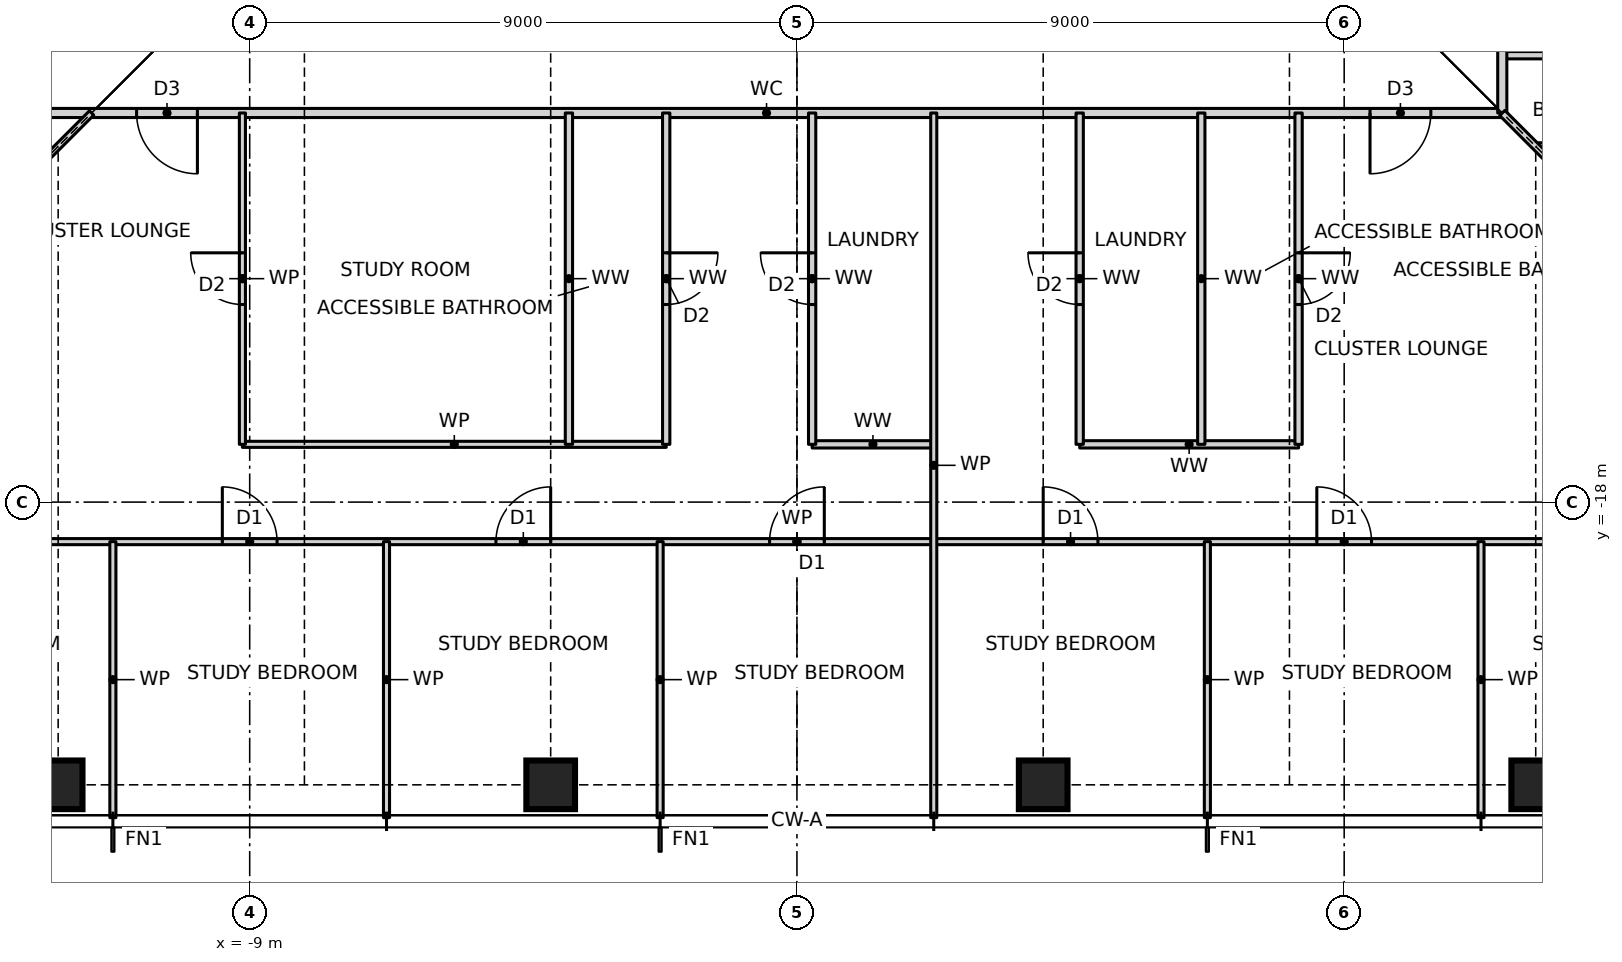
"""IFC4 building model, lengths in metres.
Left out: names, types, materials, properties, quantities, classifications, styles, units other than length and angle.
Written with IfcOpenShell. Run it as: python <this file> out.ifc"""

import sys

from ifc_helpers import new_model, si_unit, direction, frame, frame_2d, origin, origin_2d, place, context, subcontext, project, spatial, rectangle, hollow_rectangle, extrude, element, fill, save


model = new_model("IFC4")
c1 = context("Model", 3, precision=1e-05, world=origin(), true_north=direction((0.0, 1.0)))
c2 = subcontext(c1, "Body", "Model", "MODEL_VIEW")
j1 = project(units=[si_unit("LENGTHUNIT", "METRE"), si_unit("PLANEANGLEUNIT", "RADIAN")], contexts=[c1])
p1 = place(None, origin())
s1 = spatial("IfcSite", under=j1, at=p1, CompositionType="ELEMENT")
p2 = place(p1, origin())
s2 = spatial("IfcBuilding", under=s1, at=p2, CompositionType="ELEMENT")
p3 = place(p2, frame((0.0, 0.0, 50.0)))
s3 = spatial("IfcBuildingStorey", under=s2, at=p3, CompositionType="ELEMENT", Elevation=50.0)
for number, where, z_axis, x_axis in (
    (1, (-12.15, -22.65, 0.0), (0.0, 0.0, 1.0), (1.0, 0.0, 0.0)),
    (2, (-4.05, -22.65, 0.0), (0.0, 0.0, 1.0), (1.0, 0.0, 0.0)),
    (3, (4.05, -22.65, 0.0), (0.0, 0.0, 1.0), (1.0, 0.0, 0.0)),
    (4, (12.15, -22.65, 0.0), (0.0, 0.0, 1.0), (1.0, 0.0, 0.0)),
):
    element("IfcColumn", number, at=place(p3, frame(where, z_axis=z_axis, x_axis=x_axis)), inside=s3, PredefinedType="COLUMN", context=c2, shape_type="SweptSolid", body=[
        extrude(hollow_rectangle(XDim=0.8, YDim=0.8, WallThickness=0.09, at=origin_2d()), origin(), (0.0, 0.0, 1.0), 3.5),
    ])
p4 = place(p3, frame((-15.75, -18.65, 0.0), z_axis=(0.0, 0.0, 1.0), x_axis=(1.0, 0.0, 0.0)))
e5 = element("IfcWall", 5, at=p4, inside=s3, PredefinedType="PARTITIONING", context=c2, shape_type="SweptSolid", body=[
    extrude(rectangle(XDim=31.5, YDim=0.1, at=frame_2d((15.75, 0.0))), origin(), (0.0, 0.0, 1.0), 3.27),
])
p5 = place(p4, frame((1.8, 0.0, 0.0)))
e6 = element("IfcOpeningElement", 6, at=p5, cuts=e5, PredefinedType="OPENING", context=c2, shape_type="SweptSolid", body=[
    extrude(rectangle(XDim=0.9, YDim=2.1, at=frame_2d((0.45, 1.05))), frame((0.0, 0.06, 0.0), z_axis=(0.0, -1.0, 0.0), x_axis=(1.0, 0.0, 0.0)), (0.0, 0.0, 1.0), 0.12),
])
p6 = place(p4, frame((6.3, 0.0, 0.0)))
e7 = element("IfcOpeningElement", 7, at=p6, cuts=e5, PredefinedType="OPENING", context=c2, shape_type="SweptSolid", body=[
    extrude(rectangle(XDim=0.9, YDim=2.1, at=frame_2d((0.45, 1.05))), frame((0.0, 0.06, 0.0), z_axis=(0.0, -1.0, 0.0), x_axis=(1.0, 0.0, 0.0)), (0.0, 0.0, 1.0), 0.12),
])
p7 = place(p4, frame((10.8, 0.0, 0.0)))
e8 = element("IfcOpeningElement", 8, at=p7, cuts=e5, PredefinedType="OPENING", context=c2, shape_type="SweptSolid", body=[
    extrude(rectangle(XDim=0.9, YDim=2.1, at=frame_2d((0.45, 1.05))), frame((0.0, 0.06, 0.0), z_axis=(0.0, -1.0, 0.0), x_axis=(1.0, 0.0, 0.0)), (0.0, 0.0, 1.0), 0.12),
])
p8 = place(p4, frame((15.3, 0.0, 0.0)))
e9 = element("IfcOpeningElement", 9, at=p8, cuts=e5, PredefinedType="OPENING", context=c2, shape_type="SweptSolid", body=[
    extrude(rectangle(XDim=0.9, YDim=2.1, at=frame_2d((0.45, 1.05))), frame((0.0, 0.06, 0.0), z_axis=(0.0, -1.0, 0.0), x_axis=(1.0, 0.0, 0.0)), (0.0, 0.0, 1.0), 0.12),
])
p9 = place(p4, frame((19.8, 0.0, 0.0)))
e10 = element("IfcOpeningElement", 10, at=p9, cuts=e5, PredefinedType="OPENING", context=c2, shape_type="SweptSolid", body=[
    extrude(rectangle(XDim=0.9, YDim=2.1, at=frame_2d((0.45, 1.05))), frame((0.0, 0.06, 0.0), z_axis=(0.0, -1.0, 0.0), x_axis=(1.0, 0.0, 0.0)), (0.0, 0.0, 1.0), 0.12),
])
p10 = place(p4, frame((24.3, 0.0, 0.0)))
e11 = element("IfcOpeningElement", 11, at=p10, cuts=e5, PredefinedType="OPENING", context=c2, shape_type="SweptSolid", body=[
    extrude(rectangle(XDim=0.9, YDim=2.1, at=frame_2d((0.45, 1.05))), frame((0.0, 0.06, 0.0), z_axis=(0.0, -1.0, 0.0), x_axis=(1.0, 0.0, 0.0)), (0.0, 0.0, 1.0), 0.12),
])
p11 = place(p4, frame((28.8, 0.0, 0.0)))
e12 = element("IfcOpeningElement", 12, at=p11, cuts=e5, PredefinedType="OPENING", context=c2, shape_type="SweptSolid", body=[
    extrude(rectangle(XDim=0.9, YDim=2.1, at=frame_2d((0.45, 1.05))), frame((0.0, 0.06, 0.0), z_axis=(0.0, -1.0, 0.0), x_axis=(1.0, 0.0, 0.0)), (0.0, 0.0, 1.0), 0.12),
])
p12 = place(p3, frame((-9.12, -17.05, 0.0), z_axis=(0.0, 0.0, 1.0), x_axis=(1.0, 0.0, 0.0)))
e13 = element("IfcWall", 13, at=p12, inside=s3, PredefinedType="PARTITIONING", context=c2, shape_type="SweptSolid", body=[
    extrude(rectangle(XDim=6.97, YDim=0.1, at=frame_2d((3.485, 0.0))), origin(), (0.0, 0.0, 1.0), 3.27),
])
p13 = place(p3, frame((0.25, -17.05, 0.0), z_axis=(0.0, 0.0, 1.0), x_axis=(1.0, 0.0, 0.0)))
e14 = element("IfcWall", 14, at=p13, inside=s3, PredefinedType="PARTITIONING", context=c2, shape_type="SweptSolid", body=[
    extrude(rectangle(XDim=2.0, YDim=0.12, at=frame_2d((1.0, 0.0))), origin(), (0.0, 0.0, 1.0), 3.27),
])
p14 = place(p3, frame((4.65, -17.05, 0.0), z_axis=(0.0, 0.0, 1.0), x_axis=(1.0, 0.0, 0.0)))
e15 = element("IfcWall", 15, at=p14, inside=s3, PredefinedType="PARTITIONING", context=c2, shape_type="SweptSolid", body=[
    extrude(rectangle(XDim=3.6, YDim=0.12, at=frame_2d((1.8, 0.0))), origin(), (0.0, 0.0, 1.0), 3.27),
])
p15 = place(p3, frame((12.15, -12.15, 0.0), z_axis=(0.0, 0.0, 1.0), x_axis=(1.0, 0.0, 0.0)))
e16 = element("IfcWall", 16, at=p15, inside=s3, PredefinedType="PARTITIONING", context=c2, shape_type="SweptSolid", body=[
    extrude(rectangle(XDim=4.9, YDim=0.12, at=frame_2d((2.45, 0.0))), origin(), (0.0, 0.0, 1.0), 2.508),
])
p16 = place(p3, frame((-12.6, -11.6, 0.0), z_axis=(0.0, 0.0, 1.0), x_axis=(1.0, 0.0, 0.0)))
e17 = element("IfcWall", 17, at=p16, inside=s3, PredefinedType="PARTITIONING", context=c2, shape_type="SweptSolid", body=[
    extrude(rectangle(XDim=24.2, YDim=0.15, at=frame_2d((12.1, 0.0))), origin(), (0.0, 0.0, 1.0), 3.27),
])
p17 = place(p16, frame((1.74, 0.0, 0.0)))
e18 = element("IfcOpeningElement", 18, at=p17, cuts=e17, PredefinedType="OPENING", context=c2, shape_type="SweptSolid", body=[
    extrude(rectangle(XDim=1.0, YDim=2.1, at=frame_2d((0.5, 1.05))), frame((0.0, 0.085, 0.0), z_axis=(0.0, -1.0, 0.0), x_axis=(1.0, 0.0, 0.0)), (0.0, 0.0, 1.0), 0.17),
])
p18 = place(p16, frame((22.025, 0.0, 0.0)))
e19 = element("IfcOpeningElement", 19, at=p18, cuts=e17, PredefinedType="OPENING", context=c2, shape_type="SweptSolid", body=[
    extrude(rectangle(XDim=1.0, YDim=2.1, at=frame_2d((0.5, 1.05))), frame((0.0, 0.085, 0.0), z_axis=(0.0, -1.0, 0.0), x_axis=(1.0, 0.0, 0.0)), (0.0, 0.0, 1.0), 0.17),
])
p19 = place(p3, frame((11.6, -10.65, 0.0), z_axis=(0.0, 0.0, 1.0), x_axis=(1.0, 0.0, 0.0)))
e20 = element("IfcWall", 20, at=p19, inside=s3, PredefinedType="PARTITIONING", context=c2, shape_type="SweptSolid", body=[
    extrude(rectangle(XDim=5.45, YDim=0.12, at=frame_2d((2.725, 0.0))), origin(), (0.0, 0.0, 1.0), 3.27),
])
p20 = place(p19, frame((2.3, 0.0, 0.0)))
e21 = element("IfcOpeningElement", 21, at=p20, cuts=e20, PredefinedType="OPENING", context=c2, shape_type="SweptSolid", body=[
    extrude(rectangle(XDim=0.85, YDim=2.1, at=frame_2d((0.425, 1.05))), frame((0.0, 0.07, 0.0), z_axis=(0.0, -1.0, 0.0), x_axis=(1.0, 0.0, 0.0)), (0.0, 0.0, 1.0), 0.14),
])
p21 = place(p3, frame((-15.75, -15.75, 0.0), z_axis=(0.0, 0.0, 1.0), x_axis=(0.707106781187, 0.707106781187, 0.0)))
e22 = element("IfcWall", 22, at=p21, inside=s3, PredefinedType="PARTITIONING", context=c2, shape_type="SweptSolid", body=[
    extrude(rectangle(XDim=5.869, YDim=0.1, at=frame_2d((2.935, 0.0))), origin(), (0.0, 0.0, 1.0), 2.343),
])
p22 = place(p3, frame((11.6, -11.6, 0.0), z_axis=(0.0, 0.0, 1.0), x_axis=(0.0, 1.0, 0.0)))
e23 = element("IfcWall", 23, at=p22, inside=s3, PredefinedType="PARTITIONING", context=c2, shape_type="SweptSolid", body=[
    extrude(rectangle(XDim=23.2, YDim=0.15, at=frame_2d((11.6, 0.0))), origin(), (0.0, 0.0, 1.0), 3.27),
])
p23 = place(p22, frame((1.65, 0.0, 0.0)))
e24 = element("IfcOpeningElement", 24, at=p23, cuts=e23, PredefinedType="OPENING", context=c2, shape_type="SweptSolid", body=[
    extrude(rectangle(XDim=1.0, YDim=2.1, at=frame_2d((0.5, 1.05))), frame((0.0, 0.085, 0.0), z_axis=(0.0, -1.0, 0.0), x_axis=(1.0, 0.0, 0.0)), (0.0, 0.0, 1.0), 0.17),
])
p24 = place(p22, frame((3.8, 0.0, 0.0)))
e25 = element("IfcOpeningElement", 25, at=p24, cuts=e23, PredefinedType="OPENING", context=c2, shape_type="SweptSolid", body=[
    extrude(rectangle(XDim=0.9, YDim=2.1, at=frame_2d((0.45, 1.05))), frame((0.0, 0.085, 0.0), z_axis=(0.0, -1.0, 0.0), x_axis=(1.0, 0.0, 0.0)), (0.0, 0.0, 1.0), 0.17),
])
p25 = place(p3, frame((11.25, -23.19, 0.0), z_axis=(0.0, 0.0, 1.0), x_axis=(0.0, 1.0, 0.0)))
e26 = element("IfcWall", 26, at=p25, inside=s3, PredefinedType="PARTITIONING", context=c2, shape_type="SweptSolid", body=[
    extrude(rectangle(XDim=4.54, YDim=0.1, at=frame_2d((2.27, 0.0))), origin(), (0.0, 0.0, 1.0), 3.27),
])
p26 = place(p3, frame((8.25, -17.05, 0.0), z_axis=(0.0, 0.0, 1.0), x_axis=(0.0, 1.0, 0.0)))
e27 = element("IfcWall", 27, at=p26, inside=s3, PredefinedType="PARTITIONING", context=c2, shape_type="SweptSolid", body=[
    extrude(rectangle(XDim=5.45, YDim=0.12, at=frame_2d((2.725, 0.0))), origin(), (0.0, 0.0, 1.0), 3.27),
])
p27 = place(p26, frame((2.3, 0.0, 0.0)))
e28 = element("IfcOpeningElement", 28, at=p27, cuts=e27, PredefinedType="OPENING", context=c2, shape_type="SweptSolid", body=[
    extrude(rectangle(XDim=0.85, YDim=2.1, at=frame_2d((0.425, 1.05))), frame((0.0, 0.07, 0.0), z_axis=(0.0, -1.0, 0.0), x_axis=(1.0, 0.0, 0.0)), (0.0, 0.0, 1.0), 0.14),
])
p28 = place(p3, frame((6.75, -23.19, 0.0), z_axis=(0.0, 0.0, 1.0), x_axis=(0.0, 1.0, 0.0)))
e29 = element("IfcWall", 29, at=p28, inside=s3, PredefinedType="PARTITIONING", context=c2, shape_type="SweptSolid", body=[
    extrude(rectangle(XDim=4.54, YDim=0.1, at=frame_2d((2.27, 0.0))), origin(), (0.0, 0.0, 1.0), 3.27),
])
p29 = place(p3, frame((6.65, -17.05, 0.0), z_axis=(0.0, 0.0, 1.0), x_axis=(0.0, 1.0, 0.0)))
e30 = element("IfcWall", 30, at=p29, inside=s3, PredefinedType="PARTITIONING", context=c2, shape_type="SweptSolid", body=[
    extrude(rectangle(XDim=5.45, YDim=0.12, at=frame_2d((2.725, 0.0))), origin(), (0.0, 0.0, 1.0), 3.27),
])
p30 = place(p3, frame((4.65, -17.05, 0.0), z_axis=(0.0, 0.0, 1.0), x_axis=(0.0, 1.0, 0.0)))
e31 = element("IfcWall", 31, at=p30, inside=s3, PredefinedType="PARTITIONING", context=c2, shape_type="SweptSolid", body=[
    extrude(rectangle(XDim=5.45, YDim=0.12, at=frame_2d((2.725, 0.0))), origin(), (0.0, 0.0, 1.0), 3.27),
])
p31 = place(p30, frame((2.3, 0.0, 0.0)))
e32 = element("IfcOpeningElement", 32, at=p31, cuts=e31, PredefinedType="OPENING", context=c2, shape_type="SweptSolid", body=[
    extrude(rectangle(XDim=0.85, YDim=2.1, at=frame_2d((0.425, 1.05))), frame((0.0, 0.07, 0.0), z_axis=(0.0, -1.0, 0.0), x_axis=(1.0, 0.0, 0.0)), (0.0, 0.0, 1.0), 0.14),
])
p32 = place(p3, frame((2.25, -23.19, 0.0), z_axis=(0.0, 0.0, 1.0), x_axis=(0.0, 1.0, 0.0)))
e33 = element("IfcWall", 33, at=p32, inside=s3, PredefinedType="PARTITIONING", context=c2, shape_type="SweptSolid", body=[
    extrude(rectangle(XDim=11.59, YDim=0.1, at=frame_2d((5.795, 0.0))), origin(), (0.0, 0.0, 1.0), 3.27),
])
p33 = place(p3, frame((0.25, -17.05, 0.0), z_axis=(0.0, 0.0, 1.0), x_axis=(0.0, 1.0, 0.0)))
e34 = element("IfcWall", 34, at=p33, inside=s3, PredefinedType="PARTITIONING", context=c2, shape_type="SweptSolid", body=[
    extrude(rectangle(XDim=5.45, YDim=0.12, at=frame_2d((2.725, 0.0))), origin(), (0.0, 0.0, 1.0), 3.27),
])
p34 = place(p33, frame((2.3, 0.0, 0.0)))
e35 = element("IfcOpeningElement", 35, at=p34, cuts=e34, PredefinedType="OPENING", context=c2, shape_type="SweptSolid", body=[
    extrude(rectangle(XDim=0.85, YDim=2.1, at=frame_2d((0.425, 1.05))), frame((0.0, 0.07, 0.0), z_axis=(0.0, -1.0, 0.0), x_axis=(1.0, 0.0, 0.0)), (0.0, 0.0, 1.0), 0.14),
])
p35 = place(p3, frame((-2.15, -17.05, 0.0), z_axis=(0.0, 0.0, 1.0), x_axis=(0.0, 1.0, 0.0)))
e36 = element("IfcWall", 36, at=p35, inside=s3, PredefinedType="PARTITIONING", context=c2, shape_type="SweptSolid", body=[
    extrude(rectangle(XDim=5.45, YDim=0.12, at=frame_2d((2.725, 0.0))), origin(), (0.0, 0.0, 1.0), 3.27),
])
p36 = place(p35, frame((2.3, 0.0, 0.0)))
e37 = element("IfcOpeningElement", 37, at=p36, cuts=e36, PredefinedType="OPENING", context=c2, shape_type="SweptSolid", body=[
    extrude(rectangle(XDim=0.85, YDim=2.1, at=frame_2d((0.425, 1.05))), frame((0.0, 0.07, 0.0), z_axis=(0.0, -1.0, 0.0), x_axis=(1.0, 0.0, 0.0)), (0.0, 0.0, 1.0), 0.14),
])
p37 = place(p3, frame((-2.25, -23.19, 0.0), z_axis=(0.0, 0.0, 1.0), x_axis=(0.0, 1.0, 0.0)))
e38 = element("IfcWall", 38, at=p37, inside=s3, PredefinedType="PARTITIONING", context=c2, shape_type="SweptSolid", body=[
    extrude(rectangle(XDim=4.54, YDim=0.1, at=frame_2d((2.27, 0.0))), origin(), (0.0, 0.0, 1.0), 3.27),
])
p38 = place(p3, frame((-3.75, -17.05, 0.0), z_axis=(0.0, 0.0, 1.0), x_axis=(0.0, 1.0, 0.0)))
e39 = element("IfcWall", 39, at=p38, inside=s3, PredefinedType="PARTITIONING", context=c2, shape_type="SweptSolid", body=[
    extrude(rectangle(XDim=5.45, YDim=0.12, at=frame_2d((2.725, 0.0))), origin(), (0.0, 0.0, 1.0), 3.27),
])
p39 = place(p3, frame((-6.75, -23.19, 0.0), z_axis=(0.0, 0.0, 1.0), x_axis=(0.0, 1.0, 0.0)))
e40 = element("IfcWall", 40, at=p39, inside=s3, PredefinedType="PARTITIONING", context=c2, shape_type="SweptSolid", body=[
    extrude(rectangle(XDim=4.54, YDim=0.1, at=frame_2d((2.27, 0.0))), origin(), (0.0, 0.0, 1.0), 3.27),
])
p40 = place(p3, frame((-9.12, -17.05, 0.0), z_axis=(0.0, 0.0, 1.0), x_axis=(0.0, 1.0, 0.0)))
e41 = element("IfcWall", 41, at=p40, inside=s3, PredefinedType="PARTITIONING", context=c2, shape_type="SweptSolid", body=[
    extrude(rectangle(XDim=5.45, YDim=0.1, at=frame_2d((2.725, 0.0))), origin(), (0.0, 0.0, 1.0), 3.27),
])
p41 = place(p40, frame((2.3, 0.0, 0.0)))
e42 = element("IfcOpeningElement", 42, at=p41, cuts=e41, PredefinedType="OPENING", context=c2, shape_type="SweptSolid", body=[
    extrude(rectangle(XDim=0.85, YDim=2.1, at=frame_2d((0.425, 1.05))), frame((0.0, 0.06, 0.0), z_axis=(0.0, -1.0, 0.0), x_axis=(1.0, 0.0, 0.0)), (0.0, 0.0, 1.0), 0.12),
])
p42 = place(p3, frame((-11.25, -23.19, 0.0), z_axis=(0.0, 0.0, 1.0), x_axis=(0.0, 1.0, 0.0)))
e43 = element("IfcWall", 43, at=p42, inside=s3, PredefinedType="PARTITIONING", context=c2, shape_type="SweptSolid", body=[
    extrude(rectangle(XDim=4.54, YDim=0.1, at=frame_2d((2.27, 0.0))), origin(), (0.0, 0.0, 1.0), 3.27),
])
p43 = place(p3, frame((15.75, -15.75, 0.0), z_axis=(0.0, 0.0, 1.0), x_axis=(-0.707106781187, 0.707106781187, 0.0)))
e44 = element("IfcWall", 44, at=p43, inside=s3, PredefinedType="PARTITIONING", context=c2, shape_type="SweptSolid", body=[
    extrude(rectangle(XDim=5.869, YDim=0.12, at=frame_2d((2.935, 0.0))), origin(), (0.0, 0.0, 1.0), 2.343),
])
p44 = place(p6, origin())
e45 = element("IfcDoor", 45, at=p44, inside=s3, OperationType="SINGLE_SWING_LEFT", PredefinedType="DOOR", context=c2, shape_type="SweptSolid", body=[
    extrude(rectangle(XDim=0.9, YDim=2.1, at=frame_2d((0.45, 1.05))), frame((0.0, 0.025, 0.0), z_axis=(0.0, -1.0, 0.0), x_axis=(1.0, 0.0, 0.0)), (0.0, 0.0, 1.0), 0.05),
])
fill(e7, e45)
p45 = place(p7, origin())
e46 = element("IfcDoor", 46, at=p45, inside=s3, OperationType="SINGLE_SWING_RIGHT", PredefinedType="DOOR", context=c2, shape_type="SweptSolid", body=[
    extrude(rectangle(XDim=0.9, YDim=2.1, at=frame_2d((0.45, 1.05))), frame((0.0, 0.025, 0.0), z_axis=(0.0, -1.0, 0.0), x_axis=(1.0, 0.0, 0.0)), (0.0, 0.0, 1.0), 0.05),
])
fill(e8, e46)
p46 = place(p8, origin())
e47 = element("IfcDoor", 47, at=p46, inside=s3, OperationType="SINGLE_SWING_RIGHT", PredefinedType="DOOR", context=c2, shape_type="SweptSolid", body=[
    extrude(rectangle(XDim=0.9, YDim=2.1, at=frame_2d((0.45, 1.05))), frame((0.0, 0.025, 0.0), z_axis=(0.0, -1.0, 0.0), x_axis=(1.0, 0.0, 0.0)), (0.0, 0.0, 1.0), 0.05),
])
fill(e9, e47)
p47 = place(p17, frame((1.0, 0.0, 0.0), z_axis=(0.0, 0.0, 1.0), x_axis=(-1.0, 0.0, 0.0)))
e48 = element("IfcDoor", 48, at=p47, inside=s3, OperationType="SINGLE_SWING_LEFT", PredefinedType="DOOR", context=c2, shape_type="SweptSolid", body=[
    extrude(rectangle(XDim=1.0, YDim=2.1, at=frame_2d((0.5, 1.05))), frame((0.0, 0.025, 0.0), z_axis=(0.0, -1.0, 0.0), x_axis=(1.0, 0.0, 0.0)), (0.0, 0.0, 1.0), 0.05),
])
fill(e18, e48)
p48 = place(p41, origin())
e49 = element("IfcDoor", 49, at=p48, inside=s3, OperationType="SINGLE_SWING_RIGHT", PredefinedType="DOOR", context=c2, shape_type="SweptSolid", body=[
    extrude(rectangle(XDim=0.85, YDim=2.1, at=frame_2d((0.425, 1.05))), frame((0.0, 0.025, 0.0), z_axis=(0.0, -1.0, 0.0), x_axis=(1.0, 0.0, 0.0)), (0.0, 0.0, 1.0), 0.05),
])
fill(e42, e49)
p49 = place(p36, frame((0.85, 0.0, 0.0), z_axis=(0.0, 0.0, 1.0), x_axis=(-1.0, 0.0, 0.0)))
e50 = element("IfcDoor", 50, at=p49, inside=s3, OperationType="SINGLE_SWING_LEFT", PredefinedType="DOOR", context=c2, shape_type="SweptSolid", body=[
    extrude(rectangle(XDim=0.85, YDim=2.1, at=frame_2d((0.425, 1.05))), frame((0.0, 0.025, 0.0), z_axis=(0.0, -1.0, 0.0), x_axis=(1.0, 0.0, 0.0)), (0.0, 0.0, 1.0), 0.05),
])
fill(e37, e50)
p50 = place(p34, origin())
e51 = element("IfcDoor", 51, at=p50, inside=s3, OperationType="SINGLE_SWING_RIGHT", PredefinedType="DOOR", context=c2, shape_type="SweptSolid", body=[
    extrude(rectangle(XDim=0.85, YDim=2.1, at=frame_2d((0.425, 1.05))), frame((0.0, 0.025, 0.0), z_axis=(0.0, -1.0, 0.0), x_axis=(1.0, 0.0, 0.0)), (0.0, 0.0, 1.0), 0.05),
])
fill(e35, e51)
p51 = place(p9, origin())
e52 = element("IfcDoor", 52, at=p51, inside=s3, OperationType="SINGLE_SWING_LEFT", PredefinedType="DOOR", context=c2, shape_type="SweptSolid", body=[
    extrude(rectangle(XDim=0.9, YDim=2.1, at=frame_2d((0.45, 1.05))), frame((0.0, 0.025, 0.0), z_axis=(0.0, -1.0, 0.0), x_axis=(1.0, 0.0, 0.0)), (0.0, 0.0, 1.0), 0.05),
])
fill(e10, e52)
p52 = place(p10, origin())
e53 = element("IfcDoor", 53, at=p52, inside=s3, OperationType="SINGLE_SWING_LEFT", PredefinedType="DOOR", context=c2, shape_type="SweptSolid", body=[
    extrude(rectangle(XDim=0.9, YDim=2.1, at=frame_2d((0.45, 1.05))), frame((0.0, 0.025, 0.0), z_axis=(0.0, -1.0, 0.0), x_axis=(1.0, 0.0, 0.0)), (0.0, 0.0, 1.0), 0.05),
])
fill(e11, e53)
p53 = place(p18, frame((1.0, 0.0, 0.0), z_axis=(0.0, 0.0, 1.0), x_axis=(-1.0, 0.0, 0.0)))
e54 = element("IfcDoor", 54, at=p53, inside=s3, OperationType="SINGLE_SWING_RIGHT", PredefinedType="DOOR", context=c2, shape_type="SweptSolid", body=[
    extrude(rectangle(XDim=1.0, YDim=2.1, at=frame_2d((0.5, 1.05))), frame((0.0, 0.025, 0.0), z_axis=(0.0, -1.0, 0.0), x_axis=(1.0, 0.0, 0.0)), (0.0, 0.0, 1.0), 0.05),
])
fill(e19, e54)
p54 = place(p31, origin())
e55 = element("IfcDoor", 55, at=p54, inside=s3, OperationType="SINGLE_SWING_RIGHT", PredefinedType="DOOR", context=c2, shape_type="SweptSolid", body=[
    extrude(rectangle(XDim=0.85, YDim=2.1, at=frame_2d((0.425, 1.05))), frame((0.0, 0.025, 0.0), z_axis=(0.0, -1.0, 0.0), x_axis=(1.0, 0.0, 0.0)), (0.0, 0.0, 1.0), 0.05),
])
fill(e32, e55)
p55 = place(p27, frame((0.85, 0.0, 0.0), z_axis=(0.0, 0.0, 1.0), x_axis=(-1.0, 0.0, 0.0)))
e56 = element("IfcDoor", 56, at=p55, inside=s3, OperationType="SINGLE_SWING_LEFT", PredefinedType="DOOR", context=c2, shape_type="SweptSolid", body=[
    extrude(rectangle(XDim=0.85, YDim=2.1, at=frame_2d((0.425, 1.05))), frame((0.0, 0.025, 0.0), z_axis=(0.0, -1.0, 0.0), x_axis=(1.0, 0.0, 0.0)), (0.0, 0.0, 1.0), 0.05),
])
fill(e28, e56)
save(model, sys.argv[1])
